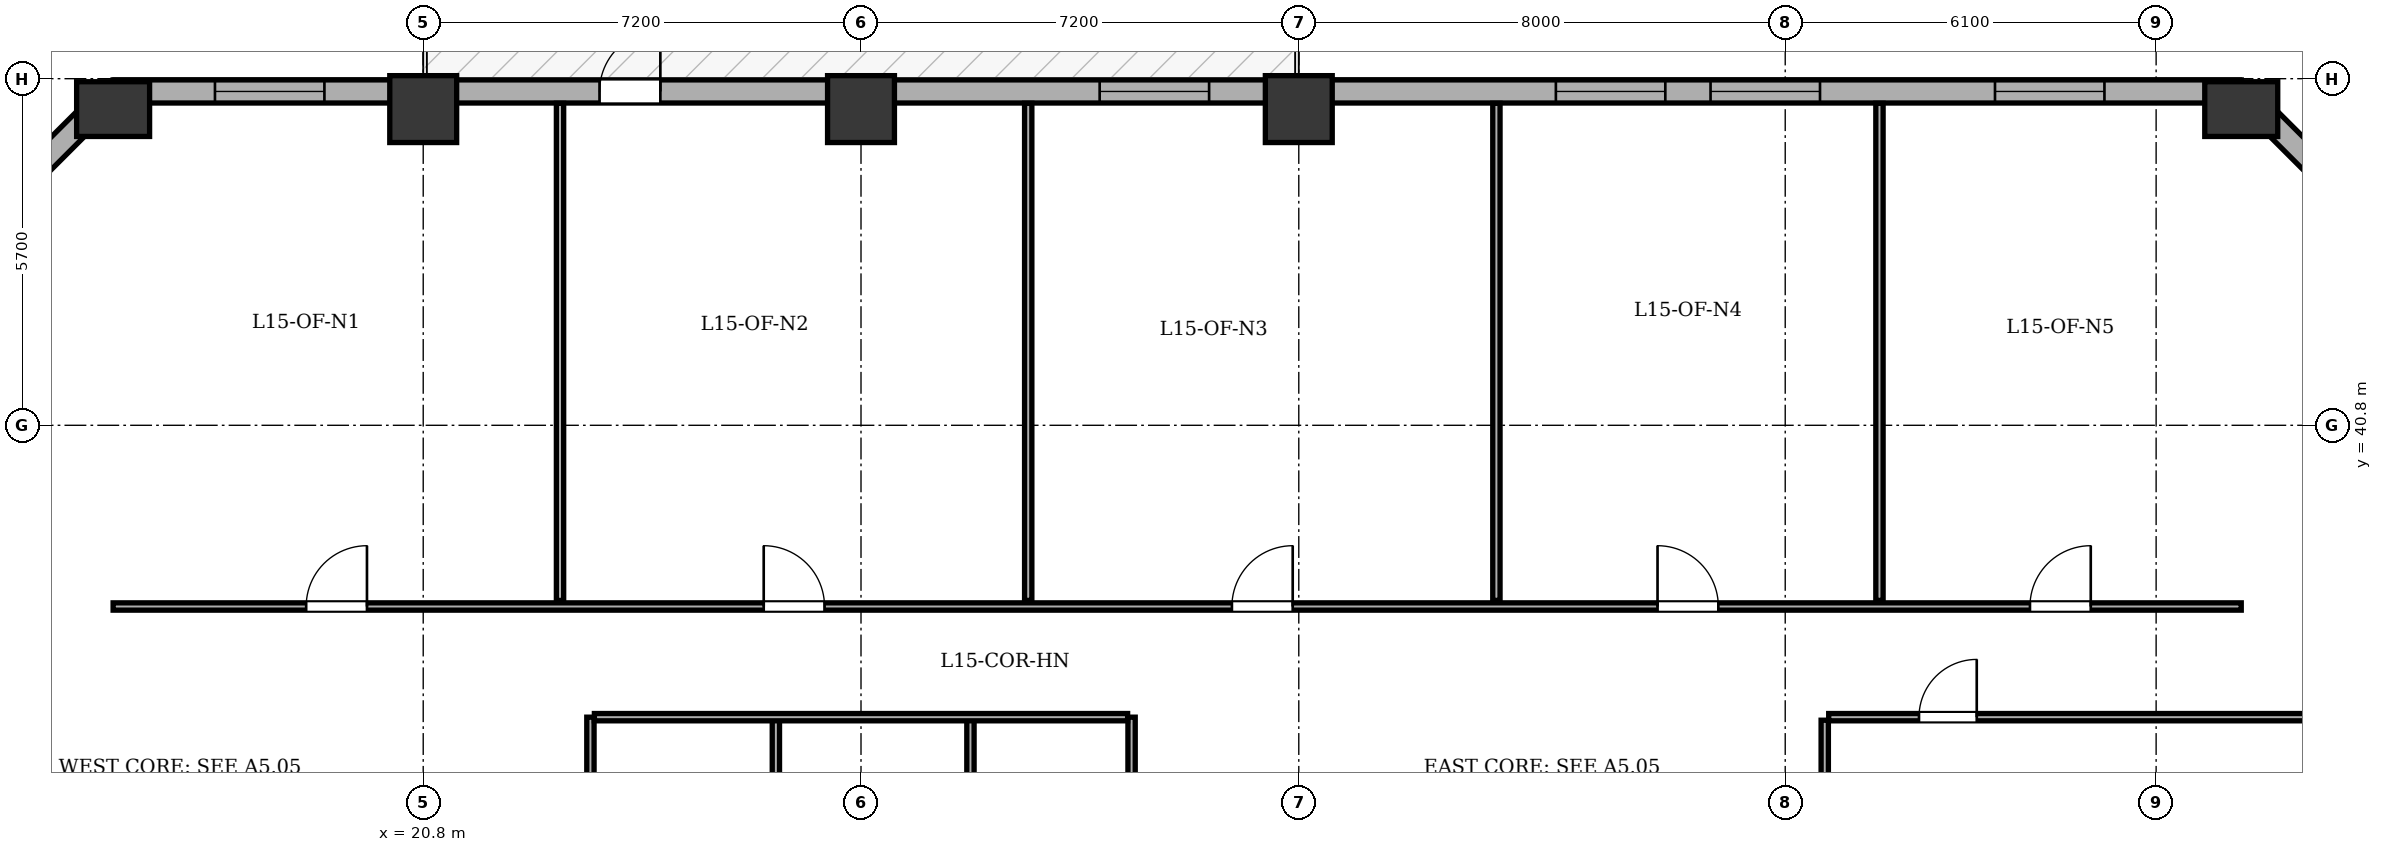
"""IFC4 building model, lengths in metres.
Left out: names, types, materials, properties, quantities, classifications, styles, units other than length and angle.
Written with IfcOpenShell. Run it as: python <this file> out.ifc"""

import sys

from ifc_helpers import new_model, si_unit, direction, frame, frame_2d, origin, origin_2d, place, context, subcontext, project, spatial, rectangle, extrude, element, fill, save


model = new_model("IFC4")
c1 = context("Model", 3, precision=1e-05, world=origin(), true_north=direction((0.0, 1.0)))
c2 = subcontext(c1, "Body", "Model", "MODEL_VIEW")
j1 = project(units=[si_unit("LENGTHUNIT", "METRE"), si_unit("PLANEANGLEUNIT", "RADIAN")], contexts=[c1])
p1 = place(None, origin())
s1 = spatial("IfcSite", under=j1, at=p1, CompositionType="ELEMENT")
p2 = place(p1, origin())
s2 = spatial("IfcBuilding", under=s1, at=p2, CompositionType="ELEMENT")
p3 = place(p2, frame((0.0, 0.0, 63.3)))
s3 = spatial("IfcBuildingStorey", under=s2, at=p3, CompositionType="ELEMENT", Elevation=63.3)
p4 = place(p3, frame((15.7, 46.0, 0.0), z_axis=(0.0, 0.0, 1.0), x_axis=(1.0, 0.0, 0.0)))
e1 = element("IfcColumn", 1, at=p4, inside=s3, PredefinedType="COLUMN", context=c2, shape_type="SweptSolid", body=[
    extrude(rectangle(XDim=0.9, YDim=1.2, at=origin_2d()), origin(), (0.0, 0.0, 1.0), 3.9),
])
for number, where, z_axis, x_axis in (
    (2, (20.8, 46.0, 0.0), (0.0, 0.0, 1.0), (1.0, 0.0, 0.0)),
    (3, (28.0, 46.0, 0.0), (0.0, 0.0, 1.0), (1.0, 0.0, 0.0)),
    (4, (35.2, 46.0, 0.0), (0.0, 0.0, 1.0), (1.0, 0.0, 0.0)),
):
    element("IfcColumn", number, at=place(p3, frame(where, z_axis=z_axis, x_axis=x_axis)), inside=s3, PredefinedType="COLUMN", context=c2, shape_type="SweptSolid", body=[
        extrude(rectangle(XDim=1.1, YDim=1.1, at=origin_2d()), origin(), (0.0, 0.0, 1.0), 3.9),
    ])
p5 = place(p3, frame((50.7, 46.0, 0.0), z_axis=(0.0, 0.0, 1.0), x_axis=(1.0, 0.0, 0.0)))
e5 = element("IfcColumn", 5, at=p5, inside=s3, PredefinedType="COLUMN", context=c2, shape_type="SweptSolid", body=[
    extrude(rectangle(XDim=0.9, YDim=1.2, at=origin_2d()), origin(), (0.0, 0.0, 1.0), 3.9),
])
p6 = place(p3, frame((10.91, 41.5, 0.0), z_axis=(0.0, 0.0, 1.0), x_axis=(0.707106781187, 0.707106781187, 0.0)))
e6 = element("IfcWall", 6, at=p6, inside=s3, PredefinedType="STANDARD", context=c2, shape_type="SweptSolid", body=[
    extrude(rectangle(XDim=6.774, YDim=0.38, at=frame_2d((3.387, 0.0))), origin(), (0.0, 0.0, 1.0), 3.135),
])
p7 = place(p6, frame((2.687, 0.0, 0.8)))
e7 = element("IfcOpeningElement", 7, at=p7, cuts=e6, PredefinedType="OPENING", context=c2, shape_type="SweptSolid", body=[
    extrude(rectangle(XDim=1.4, YDim=1.65, at=frame_2d((0.7, 0.825))), frame((0.0, 0.2, 0.0), z_axis=(0.0, -1.0, 0.0), x_axis=(1.0, 0.0, 0.0)), (0.0, 0.0, 1.0), 0.4),
])
p8 = place(p3, frame((15.7, 46.29, 0.0), z_axis=(0.0, 0.0, 1.0), x_axis=(1.0, 0.0, 0.0)))
e8 = element("IfcWall", 8, at=p8, inside=s3, PredefinedType="STANDARD", context=c2, shape_type="SweptSolid", body=[
    extrude(rectangle(XDim=35.0, YDim=0.38, at=frame_2d((17.5, 0.0))), origin(), (0.0, 0.0, 1.0), 3.135),
])
p9 = place(p8, frame((8.0, 0.0, 0.0)))
e9 = element("IfcOpeningElement", 9, at=p9, cuts=e8, PredefinedType="OPENING", context=c2, shape_type="SweptSolid", body=[
    extrude(rectangle(XDim=1.0, YDim=2.02, at=frame_2d((0.5, 1.01))), frame((0.0, 0.2, 0.0), z_axis=(0.0, -1.0, 0.0), x_axis=(1.0, 0.0, 0.0)), (0.0, 0.0, 1.0), 0.4),
])
p10 = place(p8, frame((1.675, 0.0, 0.8)))
e10 = element("IfcOpeningElement", 10, at=p10, cuts=e8, PredefinedType="OPENING", context=c2, shape_type="SweptSolid", body=[
    extrude(rectangle(XDim=1.8, YDim=1.9, at=frame_2d((0.9, 0.95))), frame((0.0, 0.2, 0.0), z_axis=(0.0, -1.0, 0.0), x_axis=(1.0, 0.0, 0.0)), (0.0, 0.0, 1.0), 0.4),
])
p11 = place(p8, frame((16.225, 0.0, 0.8)))
e11 = element("IfcOpeningElement", 11, at=p11, cuts=e8, PredefinedType="OPENING", context=c2, shape_type="SweptSolid", body=[
    extrude(rectangle(XDim=1.8, YDim=1.9, at=frame_2d((0.9, 0.95))), frame((0.0, 0.2, 0.0), z_axis=(0.0, -1.0, 0.0), x_axis=(1.0, 0.0, 0.0)), (0.0, 0.0, 1.0), 0.4),
])
p12 = place(p8, frame((23.728, 0.0, 0.8)))
e12 = element("IfcOpeningElement", 12, at=p12, cuts=e8, PredefinedType="OPENING", context=c2, shape_type="SweptSolid", body=[
    extrude(rectangle(XDim=1.8, YDim=1.9, at=frame_2d((0.9, 0.95))), frame((0.0, 0.2, 0.0), z_axis=(0.0, -1.0, 0.0), x_axis=(1.0, 0.0, 0.0)), (0.0, 0.0, 1.0), 0.4),
])
p13 = place(p8, frame((26.272, 0.0, 0.8)))
e13 = element("IfcOpeningElement", 13, at=p13, cuts=e8, PredefinedType="OPENING", context=c2, shape_type="SweptSolid", body=[
    extrude(rectangle(XDim=1.8, YDim=1.9, at=frame_2d((0.9, 0.95))), frame((0.0, 0.2, 0.0), z_axis=(0.0, -1.0, 0.0), x_axis=(1.0, 0.0, 0.0)), (0.0, 0.0, 1.0), 0.4),
])
p14 = place(p8, frame((30.95, 0.0, 0.8)))
e14 = element("IfcOpeningElement", 14, at=p14, cuts=e8, PredefinedType="OPENING", context=c2, shape_type="SweptSolid", body=[
    extrude(rectangle(XDim=1.8, YDim=1.9, at=frame_2d((0.9, 0.95))), frame((0.0, 0.2, 0.0), z_axis=(0.0, -1.0, 0.0), x_axis=(1.0, 0.0, 0.0)), (0.0, 0.0, 1.0), 0.4),
])
p15 = place(p3, frame((50.7, 46.29, 0.0), z_axis=(0.0, 0.0, 1.0), x_axis=(0.707106781187, -0.707106781187, 0.0)))
e15 = element("IfcWall", 15, at=p15, inside=s3, PredefinedType="STANDARD", context=c2, shape_type="SweptSolid", body=[
    extrude(rectangle(XDim=6.774, YDim=0.38, at=frame_2d((3.387, 0.0))), origin(), (0.0, 0.0, 1.0), 3.135),
])
p16 = place(p15, frame((2.687, 0.0, 0.8)))
e16 = element("IfcOpeningElement", 16, at=p16, cuts=e15, PredefinedType="OPENING", context=c2, shape_type="SweptSolid", body=[
    extrude(rectangle(XDim=1.4, YDim=1.65, at=frame_2d((0.7, 0.825))), frame((0.0, 0.2, 0.0), z_axis=(0.0, -1.0, 0.0), x_axis=(1.0, 0.0, 0.0)), (0.0, 0.0, 1.0), 0.4),
])
for number, where, z_axis, x_axis in (
    (17, (23.55, 24.715, 0.0), (0.0, 0.0, 1.0), (0.0, 1.0, 0.0)),
    (18, (32.45, 24.715, 0.0), (0.0, 0.0, 1.0), (0.0, 1.0, 0.0)),
    (19, (26.6, 24.715, 0.0), (0.0, 0.0, 1.0), (0.0, 1.0, 0.0)),
):
    element("IfcWall", number, at=place(p3, frame(where, z_axis=z_axis, x_axis=x_axis)), inside=s3, PredefinedType="PARTITIONING", context=c2, shape_type="SweptSolid", body=[
        extrude(rectangle(XDim=11.285, YDim=0.12, at=frame_2d((5.643, 0.0))), origin(), (0.0, 0.0, 1.0), 3.6),
    ])
p17 = place(p3, frame((29.8, 24.715, 0.0), z_axis=(0.0, 0.0, 1.0), x_axis=(0.0, 1.0, 0.0)))
e20 = element("IfcWall", 20, at=p17, inside=s3, PredefinedType="PARTITIONING", context=c2, shape_type="SweptSolid", body=[
    extrude(rectangle(XDim=11.285, YDim=0.12, at=frame_2d((5.643, 0.0))), origin(), (0.0, 0.0, 1.0), 3.135),
])
p18 = place(p3, frame((23.615, 36.0, 0.0), z_axis=(0.0, 0.0, 1.0), x_axis=(1.0, 0.0, 0.0)))
e21 = element("IfcWall", 21, at=p18, inside=s3, PredefinedType="PARTITIONING", context=c2, shape_type="SweptSolid", body=[
    extrude(rectangle(XDim=8.77, YDim=0.12, at=frame_2d((4.385, 0.0))), origin(), (0.0, 0.0, 1.0), 3.6),
])
p19 = place(p3, frame((15.7, 37.82, 0.0), z_axis=(0.0, 0.0, 1.0), x_axis=(1.0, 0.0, 0.0)))
e22 = element("IfcWall", 22, at=p19, inside=s3, PredefinedType="PARTITIONING", context=c2, shape_type="SweptSolid", body=[
    extrude(rectangle(XDim=35.0, YDim=0.12, at=frame_2d((17.5, 0.0))), origin(), (0.0, 0.0, 1.0), 3.6),
])
p20 = place(p19, frame((3.175, 0.0, 0.0)))
e23 = element("IfcOpeningElement", 23, at=p20, cuts=e22, PredefinedType="OPENING", context=c2, shape_type="SweptSolid", body=[
    extrude(rectangle(XDim=1.0, YDim=2.1, at=frame_2d((0.5, 1.05))), frame((0.0, 0.07, 0.0), z_axis=(0.0, -1.0, 0.0), x_axis=(1.0, 0.0, 0.0)), (0.0, 0.0, 1.0), 0.14),
])
p21 = place(p19, frame((10.7, 0.0, 0.0)))
e24 = element("IfcOpeningElement", 24, at=p21, cuts=e22, PredefinedType="OPENING", context=c2, shape_type="SweptSolid", body=[
    extrude(rectangle(XDim=1.0, YDim=2.1, at=frame_2d((0.5, 1.05))), frame((0.0, 0.07, 0.0), z_axis=(0.0, -1.0, 0.0), x_axis=(1.0, 0.0, 0.0)), (0.0, 0.0, 1.0), 0.14),
])
p22 = place(p19, frame((18.4, 0.0, 0.0)))
e25 = element("IfcOpeningElement", 25, at=p22, cuts=e22, PredefinedType="OPENING", context=c2, shape_type="SweptSolid", body=[
    extrude(rectangle(XDim=1.0, YDim=2.1, at=frame_2d((0.5, 1.05))), frame((0.0, 0.07, 0.0), z_axis=(0.0, -1.0, 0.0), x_axis=(1.0, 0.0, 0.0)), (0.0, 0.0, 1.0), 0.14),
])
p23 = place(p19, frame((25.4, 0.0, 0.0)))
e26 = element("IfcOpeningElement", 26, at=p23, cuts=e22, PredefinedType="OPENING", context=c2, shape_type="SweptSolid", body=[
    extrude(rectangle(XDim=1.0, YDim=2.1, at=frame_2d((0.5, 1.05))), frame((0.0, 0.07, 0.0), z_axis=(0.0, -1.0, 0.0), x_axis=(1.0, 0.0, 0.0)), (0.0, 0.0, 1.0), 0.14),
])
p24 = place(p19, frame((31.525, 0.0, 0.0)))
e27 = element("IfcOpeningElement", 27, at=p24, cuts=e22, PredefinedType="OPENING", context=c2, shape_type="SweptSolid", body=[
    extrude(rectangle(XDim=1.0, YDim=2.1, at=frame_2d((0.5, 1.05))), frame((0.0, 0.07, 0.0), z_axis=(0.0, -1.0, 0.0), x_axis=(1.0, 0.0, 0.0)), (0.0, 0.0, 1.0), 0.14),
])
for number, where, z_axis, x_axis in (
    (28, (23.05, 37.92, 0.0), (0.0, 0.0, 1.0), (0.0, 1.0, 0.0)),
    (29, (30.75, 37.92, 0.0), (0.0, 0.0, 1.0), (0.0, 1.0, 0.0)),
    (30, (38.45, 37.92, 0.0), (0.0, 0.0, 1.0), (0.0, 1.0, 0.0)),
    (31, (44.75, 37.92, 0.0), (0.0, 0.0, 1.0), (0.0, 1.0, 0.0)),
):
    element("IfcWall", number, at=place(p3, frame(where, z_axis=z_axis, x_axis=x_axis)), inside=s3, PredefinedType="PARTITIONING", context=c2, shape_type="SweptSolid", body=[
        extrude(rectangle(XDim=8.175, YDim=0.12, at=frame_2d((4.087, 0.0))), origin(), (0.0, 0.0, 1.0), 3.6),
    ])
p25 = place(p3, frame((43.85, 18.45, 0.0), z_axis=(0.0, 0.0, 1.0), x_axis=(0.0, 1.0, 0.0)))
e32 = element("IfcWall", 32, at=p25, inside=s3, PredefinedType="PARTITIONING", context=c2, shape_type="SweptSolid", body=[
    extrude(rectangle(XDim=17.5, YDim=0.12, at=frame_2d((8.75, 0.0))), origin(), (0.0, 0.0, 1.0), 3.6),
])
p26 = place(p3, frame((43.915, 36.0, 0.0), z_axis=(0.0, 0.0, 1.0), x_axis=(1.0, 0.0, 0.0)))
e33 = element("IfcWall", 33, at=p26, inside=s3, PredefinedType="PARTITIONING", context=c2, shape_type="SweptSolid", body=[
    extrude(rectangle(XDim=11.38, YDim=0.12, at=frame_2d((5.69, 0.0))), origin(), (0.0, 0.0, 1.0), 3.6),
])
p27 = place(p26, frame((1.485, 0.0, 0.0)))
e34 = element("IfcOpeningElement", 34, at=p27, cuts=e33, PredefinedType="OPENING", context=c2, shape_type="SweptSolid", body=[
    extrude(rectangle(XDim=0.95, YDim=2.1, at=frame_2d((0.475, 1.05))), frame((0.0, 0.07, 0.0), z_axis=(0.0, -1.0, 0.0), x_axis=(1.0, 0.0, 0.0)), (0.0, 0.0, 1.0), 0.14),
])
p28 = place(p9, origin())
e35 = element("IfcDoor", 35, at=p28, inside=s3, OperationType="SINGLE_SWING_RIGHT", PredefinedType="DOOR", context=c2, shape_type="SweptSolid", body=[
    extrude(rectangle(XDim=1.0, YDim=2.02, at=frame_2d((0.5, 1.01))), frame((0.0, 0.025, 0.0), z_axis=(0.0, -1.0, 0.0), x_axis=(1.0, 0.0, 0.0)), (0.0, 0.0, 1.0), 0.05),
])
fill(e9, e35)
p29 = place(p10, origin())
e36 = element("IfcWindow", 36, at=p29, inside=s3, PartitioningType="SINGLE_PANEL", PredefinedType="WINDOW", context=c2, shape_type="SweptSolid", body=[
    extrude(rectangle(XDim=1.8, YDim=1.9, at=frame_2d((0.9, 0.95))), frame((0.0, -0.01, 0.0), z_axis=(0.0, -1.0, 0.0), x_axis=(1.0, 0.0, 0.0)), (0.0, 0.0, 1.0), 0.06),
])
fill(e10, e36)
p30 = place(p11, origin())
e37 = element("IfcWindow", 37, at=p30, inside=s3, PartitioningType="SINGLE_PANEL", PredefinedType="WINDOW", context=c2, shape_type="SweptSolid", body=[
    extrude(rectangle(XDim=1.8, YDim=1.9, at=frame_2d((0.9, 0.95))), frame((0.0, -0.01, 0.0), z_axis=(0.0, -1.0, 0.0), x_axis=(1.0, 0.0, 0.0)), (0.0, 0.0, 1.0), 0.06),
])
fill(e11, e37)
p31 = place(p12, origin())
e38 = element("IfcWindow", 38, at=p31, inside=s3, PartitioningType="SINGLE_PANEL", PredefinedType="WINDOW", context=c2, shape_type="SweptSolid", body=[
    extrude(rectangle(XDim=1.8, YDim=1.9, at=frame_2d((0.9, 0.95))), frame((0.0, -0.01, 0.0), z_axis=(0.0, -1.0, 0.0), x_axis=(1.0, 0.0, 0.0)), (0.0, 0.0, 1.0), 0.06),
])
fill(e12, e38)
p32 = place(p13, origin())
e39 = element("IfcWindow", 39, at=p32, inside=s3, PartitioningType="SINGLE_PANEL", PredefinedType="WINDOW", context=c2, shape_type="SweptSolid", body=[
    extrude(rectangle(XDim=1.8, YDim=1.9, at=frame_2d((0.9, 0.95))), frame((0.0, -0.01, 0.0), z_axis=(0.0, -1.0, 0.0), x_axis=(1.0, 0.0, 0.0)), (0.0, 0.0, 1.0), 0.06),
])
fill(e13, e39)
p33 = place(p14, origin())
e40 = element("IfcWindow", 40, at=p33, inside=s3, PartitioningType="SINGLE_PANEL", PredefinedType="WINDOW", context=c2, shape_type="SweptSolid", body=[
    extrude(rectangle(XDim=1.8, YDim=1.9, at=frame_2d((0.9, 0.95))), frame((0.0, -0.01, 0.0), z_axis=(0.0, -1.0, 0.0), x_axis=(1.0, 0.0, 0.0)), (0.0, 0.0, 1.0), 0.06),
])
fill(e14, e40)
p34 = place(p20, origin())
e41 = element("IfcDoor", 41, at=p34, inside=s3, OperationType="SINGLE_SWING_RIGHT", PredefinedType="DOOR", context=c2, shape_type="SweptSolid", body=[
    extrude(rectangle(XDim=1.0, YDim=2.1, at=frame_2d((0.5, 1.05))), frame((0.0, 0.025, 0.0), z_axis=(0.0, -1.0, 0.0), x_axis=(1.0, 0.0, 0.0)), (0.0, 0.0, 1.0), 0.05),
])
fill(e23, e41)
p35 = place(p21, origin())
e42 = element("IfcDoor", 42, at=p35, inside=s3, OperationType="SINGLE_SWING_LEFT", PredefinedType="DOOR", context=c2, shape_type="SweptSolid", body=[
    extrude(rectangle(XDim=1.0, YDim=2.1, at=frame_2d((0.5, 1.05))), frame((0.0, 0.025, 0.0), z_axis=(0.0, -1.0, 0.0), x_axis=(1.0, 0.0, 0.0)), (0.0, 0.0, 1.0), 0.05),
])
fill(e24, e42)
p36 = place(p22, origin())
e43 = element("IfcDoor", 43, at=p36, inside=s3, OperationType="SINGLE_SWING_RIGHT", PredefinedType="DOOR", context=c2, shape_type="SweptSolid", body=[
    extrude(rectangle(XDim=1.0, YDim=2.1, at=frame_2d((0.5, 1.05))), frame((0.0, 0.025, 0.0), z_axis=(0.0, -1.0, 0.0), x_axis=(1.0, 0.0, 0.0)), (0.0, 0.0, 1.0), 0.05),
])
fill(e25, e43)
p37 = place(p23, origin())
e44 = element("IfcDoor", 44, at=p37, inside=s3, OperationType="SINGLE_SWING_LEFT", PredefinedType="DOOR", context=c2, shape_type="SweptSolid", body=[
    extrude(rectangle(XDim=1.0, YDim=2.1, at=frame_2d((0.5, 1.05))), frame((0.0, 0.025, 0.0), z_axis=(0.0, -1.0, 0.0), x_axis=(1.0, 0.0, 0.0)), (0.0, 0.0, 1.0), 0.05),
])
fill(e26, e44)
p38 = place(p24, origin())
e45 = element("IfcDoor", 45, at=p38, inside=s3, OperationType="SINGLE_SWING_RIGHT", PredefinedType="DOOR", context=c2, shape_type="SweptSolid", body=[
    extrude(rectangle(XDim=1.0, YDim=2.1, at=frame_2d((0.5, 1.05))), frame((0.0, 0.025, 0.0), z_axis=(0.0, -1.0, 0.0), x_axis=(1.0, 0.0, 0.0)), (0.0, 0.0, 1.0), 0.05),
])
fill(e27, e45)
p39 = place(p27, origin())
e46 = element("IfcDoor", 46, at=p39, inside=s3, OperationType="SINGLE_SWING_RIGHT", PredefinedType="DOOR", context=c2, shape_type="SweptSolid", body=[
    extrude(rectangle(XDim=0.95, YDim=2.1, at=frame_2d((0.475, 1.05))), frame((0.0, 0.025, 0.0), z_axis=(0.0, -1.0, 0.0), x_axis=(1.0, 0.0, 0.0)), (0.0, 0.0, 1.0), 0.05),
])
fill(e34, e46)
save(model, sys.argv[1])
